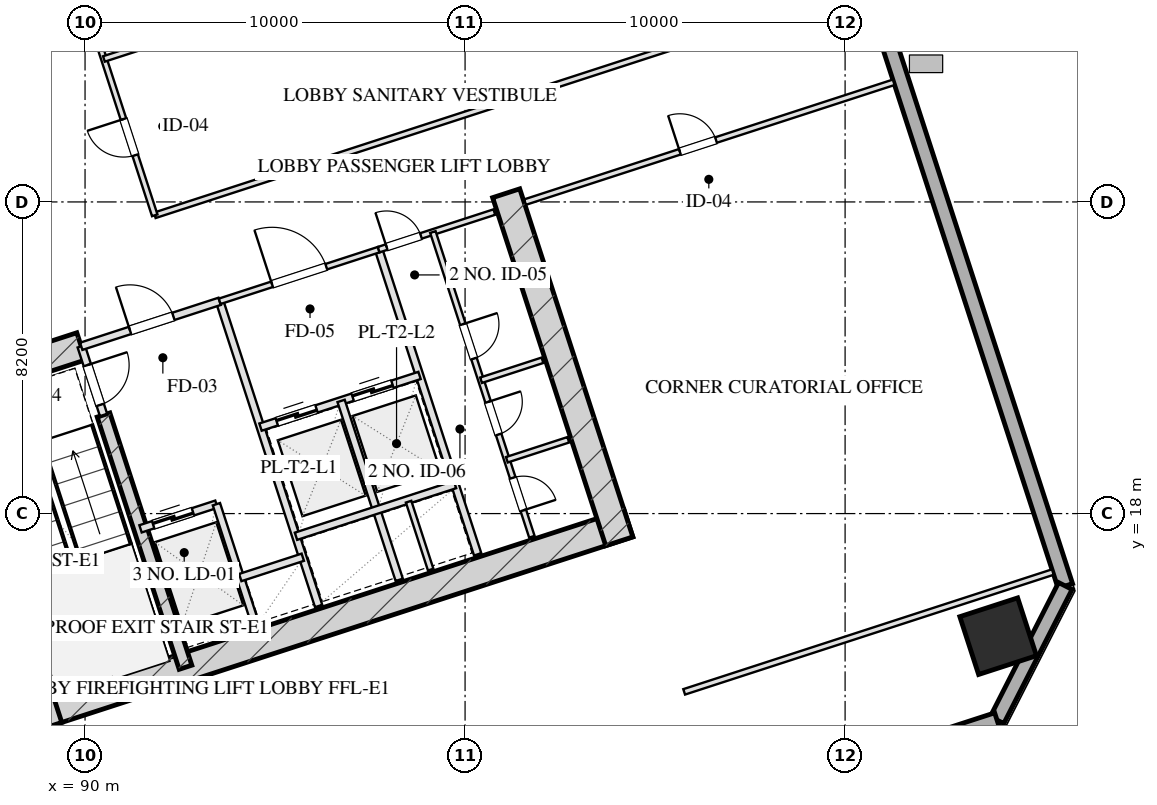
"""IFC4 building model, lengths in metres.
Left out: names, types, materials, properties, quantities, classifications, styles, units other than length and angle.
Written with IfcOpenShell. Run it as: python <this file> out.ifc"""

import sys

from ifc_helpers import new_model, si_unit, direction, frame, frame_2d, origin, origin_2d, place, context, subcontext, project, spatial, rectangle, hollow_rectangle, extrude, element, fill, save


model = new_model("IFC4")
c1 = context("Model", 3, precision=1e-05, world=origin(), true_north=direction((0.0, 1.0)))
c2 = subcontext(c1, "Body", "Model", "MODEL_VIEW")
j1 = project(units=[si_unit("LENGTHUNIT", "METRE"), si_unit("PLANEANGLEUNIT", "RADIAN")], contexts=[c1])
p1 = place(None, origin())
s1 = spatial("IfcSite", under=j1, at=p1, CompositionType="ELEMENT")
p2 = place(p1, origin())
s2 = spatial("IfcBuilding", under=s1, at=p2, CompositionType="ELEMENT")
p3 = place(p2, frame((0.0, 0.0, 34.0)))
s3 = spatial("IfcBuildingStorey", under=s2, at=p3, CompositionType="ELEMENT", Elevation=34.0)
p4 = place(p3, frame((88.559, 12.629, 0.0), z_axis=(0.0, 0.0, 1.0), x_axis=(0.951056072937, 0.309018358888, 0.0)))
e1 = element("IfcWall", 1, at=p4, inside=s3, PredefinedType="SHEAR", context=c2, shape_type="SweptSolid", body=[
    extrude(rectangle(XDim=16.55, YDim=0.75, at=frame_2d((8.275, 0.0))), origin(), (0.0, 0.0, 1.0), 4.0),
])
p5 = place(p3, frame((86.055, 21.546, 0.0), z_axis=(0.0, 0.0, 1.0), x_axis=(0.309023585745, -0.951054374604, 0.0)))
e2 = element("IfcWall", 2, at=p5, inside=s3, PredefinedType="SHEAR", context=c2, shape_type="SweptSolid", body=[
    extrude(rectangle(XDim=9.63, YDim=0.75, at=frame_2d((4.815, 0.0))), origin(), (0.0, 0.0, 1.0), 4.0),
])
p6 = place(p3, frame((101.082, 26.429, 0.0), z_axis=(0.0, 0.0, 1.0), x_axis=(0.309016134813, -0.951056795583, 0.0)))
e3 = element("IfcWall", 3, at=p6, inside=s3, PredefinedType="SHEAR", context=c2, shape_type="SweptSolid", body=[
    extrude(rectangle(XDim=9.63, YDim=0.75, at=frame_2d((4.815, 0.0))), origin(), (0.0, 0.0, 1.0), 4.0),
])
p7 = place(p3, frame((90.486, 20.594, 0.0), z_axis=(0.0, 0.0, 1.0), x_axis=(0.309020428229, -0.951055400562, 0.0)))
e4 = element("IfcWall", 4, at=p7, inside=s3, PredefinedType="SHEAR", context=c2, shape_type="SweptSolid", body=[
    extrude(rectangle(XDim=6.98, YDim=0.35, at=frame_2d((3.49, 0.0))), origin(), (0.0, 0.0, 1.0), 4.0),
])
p8 = place(p3, frame((85.814, 21.074, 0.0), z_axis=(0.0, 0.0, 1.0), x_axis=(0.95106580992, 0.308988390074, 0.0)))
e5 = element("IfcWall", 5, at=p8, inside=s3, PredefinedType="SHEAR", context=c2, shape_type="SweptSolid", body=[
    extrude(rectangle(XDim=4.295, YDim=0.75, at=frame_2d((2.147, 0.0))), origin(), (0.0, 0.0, 1.0), 4.0),
])
p9 = place(p3, frame((114.027, 14.774, 0.0), z_axis=(0.0, 0.0, 1.0), x_axis=(0.951056516295, 0.309016994375, 0.0)))
e6 = element("IfcColumn", 6, at=p9, inside=s3, PredefinedType="COLUMN", context=c2, shape_type="SweptSolid", body=[
    extrude(hollow_rectangle(XDim=1.6, YDim=1.6, WallThickness=0.055, at=origin_2d()), origin(), (0.0, 0.0, 1.0), 4.001),
])
p10 = place(p3, frame((100.345, 63.648, 0.0), z_axis=(0.0, 0.0, 1.0), x_axis=(0.309014526607, -0.951057318118, 0.0)))
e7 = element("IfcWall", 7, at=p10, inside=s3, PredefinedType="SOLIDWALL", context=c2, shape_type="SweptSolid", body=[
    extrude(rectangle(XDim=50.0, YDim=0.4, at=frame_2d((25.0, 0.0))), origin(), (0.0, 0.0, 1.0), 3.16),
])
p11 = place(p10, frame((30.15, 0.0, 0.75)))
e8 = element("IfcOpeningElement", 8, at=p11, cuts=e7, PredefinedType="OPENING", context=c2, shape_type="SweptSolid", body=[
    extrude(rectangle(XDim=2.5, YDim=1.75, at=frame_2d((1.25, 0.875))), frame((0.0, 0.21, 0.0), z_axis=(0.0, -1.0, 0.0), x_axis=(1.0, 0.0, 0.0)), (0.0, 0.0, 1.0), 0.42),
])
p12 = place(p10, frame((21.354, 0.0, 0.0)))
e9 = element("IfcOpeningElement", 9, at=p12, cuts=e7, PredefinedType="OPENING", context=c2, shape_type="SweptSolid", body=[
    extrude(rectangle(XDim=1.1, YDim=2.15, at=frame_2d((0.55, 1.075))), frame((0.0, 0.21, 0.0), z_axis=(0.0, -1.0, 0.0), x_axis=(1.0, 0.0, 0.0)), (0.0, 0.0, 1.0), 0.42),
])
p13 = place(p3, frame((115.795, 16.095, 0.0), z_axis=(0.0, 0.0, 1.0), x_axis=(-0.453958106755, -0.891023028497, 0.0)))
e10 = element("IfcWall", 10, at=p13, inside=s3, PredefinedType="SOLIDWALL", context=c2, shape_type="SweptSolid", body=[
    extrude(rectangle(XDim=3.96, YDim=0.4, at=frame_2d((1.98, 0.0))), origin(), (0.0, 0.0, 1.0), 3.16),
])
p14 = place(p3, frame((113.998, 12.567, 0.0), z_axis=(0.0, 0.0, 1.0), x_axis=(-0.951055939317, -0.309018770125, 0.0)))
e11 = element("IfcWall", 11, at=p14, inside=s3, PredefinedType="SOLIDWALL", context=c2, shape_type="SweptSolid", body=[
    extrude(rectangle(XDim=32.4, YDim=0.4, at=frame_2d((16.2, 0.0))), origin(), (0.0, 0.0, 1.0), 3.16),
])
p15 = place(p3, frame((89.899, 22.401, 0.0), z_axis=(0.0, 0.0, 1.0), x_axis=(0.308932062672, -0.951084108086, 0.0)))
e12 = element("IfcWall", 12, at=p15, inside=s3, PredefinedType="PARTITIONING", context=c2, shape_type="SweptSolid", body=[
    extrude(rectangle(XDim=1.9, YDim=0.2, at=frame_2d((0.95, 0.0))), origin(), (0.0, 0.0, 1.0), 3.725),
])
p16 = place(p15, frame((0.52, 0.0, 0.0)))
e13 = element("IfcOpeningElement", 13, at=p16, cuts=e12, PredefinedType="OPENING", context=c2, shape_type="SweptSolid", body=[
    extrude(rectangle(XDim=1.1, YDim=2.05, at=frame_2d((0.55, 1.025))), frame((0.0, 0.11, 0.0), z_axis=(0.0, -1.0, 0.0), x_axis=(1.0, 0.0, 0.0)), (0.0, 0.0, 1.0), 0.22),
])
p17 = place(p3, frame((93.542, 23.585, 0.0), z_axis=(0.0, 0.0, 1.0), x_axis=(0.309042196757, -0.951048327176, 0.0)))
e14 = element("IfcWall", 14, at=p17, inside=s3, PredefinedType="PARTITIONING", context=c2, shape_type="SweptSolid", body=[
    extrude(rectangle(XDim=8.43, YDim=0.2, at=frame_2d((4.215, 0.0))), origin(), (0.0, 0.0, 1.0), 3.725),
])
p18 = place(p3, frame((89.899, 22.401, 0.0), z_axis=(0.0, 0.0, 1.0), x_axis=(0.951046716504, 0.309047153403, 0.0)))
e15 = element("IfcWall", 15, at=p18, inside=s3, PredefinedType="PARTITIONING", context=c2, shape_type="SweptSolid", body=[
    extrude(rectangle(XDim=3.83, YDim=0.2, at=frame_2d((1.915, 0.0))), origin(), (0.0, 0.0, 1.0), 3.725),
])
p19 = place(p18, frame((1.35, 0.0, 0.0)))
e16 = element("IfcOpeningElement", 16, at=p19, cuts=e15, PredefinedType="OPENING", context=c2, shape_type="SweptSolid", body=[
    extrude(rectangle(XDim=1.2, YDim=2.05, at=frame_2d((0.6, 1.025))), frame((0.0, 0.11, 0.0), z_axis=(0.0, -1.0, 0.0), x_axis=(1.0, 0.0, 0.0)), (0.0, 0.0, 1.0), 0.22),
])
p20 = place(p3, frame((91.46, 17.598, 0.0), z_axis=(0.0, 0.0, 1.0), x_axis=(0.951062257173, 0.308999325213, 0.0)))
e17 = element("IfcWall", 17, at=p20, inside=s3, PredefinedType="PARTITIONING", context=c2, shape_type="SweptSolid", body=[
    extrude(rectangle(XDim=2.1, YDim=0.2, at=frame_2d((1.05, 0.0))), origin(), (0.0, 0.0, 1.0), 3.725),
])
p21 = place(p20, frame((0.35, 0.0, 0.0)))
e18 = element("IfcOpeningElement", 18, at=p21, cuts=e17, PredefinedType="OPENING", context=c2, shape_type="SweptSolid", body=[
    extrude(rectangle(XDim=1.1, YDim=2.05, at=frame_2d((0.55, 1.025))), frame((0.0, 0.11, 0.0), z_axis=(0.0, -1.0, 0.0), x_axis=(1.0, 0.0, 0.0)), (0.0, 0.0, 1.0), 0.22),
])
p22 = place(p3, frame((93.457, 18.247, 0.0), z_axis=(0.0, 0.0, 1.0), x_axis=(0.3089935693, -0.951064127245, 0.0)))
e19 = element("IfcWall", 19, at=p22, inside=s3, PredefinedType="PARTITIONING", context=c2, shape_type="SweptSolid", body=[
    extrude(rectangle(XDim=3.7, YDim=0.2, at=frame_2d((1.85, 0.0))), origin(), (0.0, 0.0, 1.0), 3.725),
])
p23 = place(p3, frame((94.084, 16.317, 0.0), z_axis=(0.0, 0.0, 1.0), x_axis=(0.951041328149, 0.309063734775, 0.0)))
e20 = element("IfcWall", 20, at=p23, inside=s3, PredefinedType="PARTITIONING", context=c2, shape_type="SweptSolid", body=[
    extrude(rectangle(XDim=1.73, YDim=0.2, at=frame_2d((0.865, 0.0))), origin(), (0.0, 0.0, 1.0), 3.725),
])
p24 = place(p3, frame((97.727, 24.944, 0.0), z_axis=(0.0, 0.0, 1.0), x_axis=(0.309016001439, -0.951056838919, 0.0)))
e21 = element("IfcWall", 21, at=p24, inside=s3, PredefinedType="PARTITIONING", context=c2, shape_type="SweptSolid", body=[
    extrude(rectangle(XDim=8.43, YDim=0.2, at=frame_2d((4.215, 0.0))), origin(), (0.0, 0.0, 1.0), 3.725),
])
p25 = place(p3, frame((93.542, 23.585, 0.0), z_axis=(0.0, 0.0, 1.0), x_axis=(0.951063829732, 0.308994485023, 0.0)))
e22 = element("IfcWall", 22, at=p25, inside=s3, PredefinedType="PARTITIONING", context=c2, shape_type="SweptSolid", body=[
    extrude(rectangle(XDim=4.4, YDim=0.15, at=frame_2d((2.2, 0.0))), origin(), (0.0, 0.0, 1.0), 3.725),
])
p26 = place(p25, frame((1.45, 0.0, 0.0)))
e23 = element("IfcOpeningElement", 23, at=p26, cuts=e22, PredefinedType="OPENING", context=c2, shape_type="SweptSolid", body=[
    extrude(rectangle(XDim=1.5, YDim=2.05, at=frame_2d((0.75, 1.025))), frame((0.0, 0.085, 0.0), z_axis=(0.0, -1.0, 0.0), x_axis=(1.0, 0.0, 0.0)), (0.0, 0.0, 1.0), 0.17),
])
p27 = place(p3, frame((94.617, 20.275, 0.0), z_axis=(0.0, 0.0, 1.0), x_axis=(0.951058531764, 0.30901079133, 0.0)))
e24 = element("IfcWall", 24, at=p27, inside=s3, PredefinedType="PARTITIONING", context=c2, shape_type="SweptSolid", body=[
    extrude(rectangle(XDim=4.4, YDim=0.2, at=frame_2d((2.2, 0.0))), origin(), (0.0, 0.0, 1.0), 3.725),
])
p28 = place(p27, frame((0.45, 0.0, 0.0)))
e25 = element("IfcOpeningElement", 25, at=p28, cuts=e24, PredefinedType="OPENING", context=c2, shape_type="SweptSolid", body=[
    extrude(rectangle(XDim=1.1, YDim=2.05, at=frame_2d((0.55, 1.025))), frame((0.0, 0.11, 0.0), z_axis=(0.0, -1.0, 0.0), x_axis=(1.0, 0.0, 0.0)), (0.0, 0.0, 1.0), 0.22),
])
p29 = place(p27, frame((2.55, 0.0, 0.0)))
e26 = element("IfcOpeningElement", 26, at=p29, cuts=e24, PredefinedType="OPENING", context=c2, shape_type="SweptSolid", body=[
    extrude(rectangle(XDim=1.1, YDim=2.05, at=frame_2d((0.55, 1.025))), frame((0.0, 0.11, 0.0), z_axis=(0.0, -1.0, 0.0), x_axis=(1.0, 0.0, 0.0)), (0.0, 0.0, 1.0), 0.22),
])
p30 = place(p3, frame((96.738, 20.964, 0.0), z_axis=(0.0, 0.0, 1.0), x_axis=(0.309042578481, -0.951048203135, 0.0)))
e27 = element("IfcWall", 27, at=p30, inside=s3, PredefinedType="PARTITIONING", context=c2, shape_type="SweptSolid", body=[
    extrude(rectangle(XDim=4.95, YDim=0.2, at=frame_2d((2.475, 0.0))), origin(), (0.0, 0.0, 1.0), 3.725),
])
p31 = place(p3, frame((95.551, 17.403, 0.0), z_axis=(0.0, 0.0, 1.0), x_axis=(0.951058531764, 0.30901079133, 0.0)))
e28 = element("IfcWall", 28, at=p31, inside=s3, PredefinedType="PARTITIONING", context=c2, shape_type="SweptSolid", body=[
    extrude(rectangle(XDim=4.4, YDim=0.2, at=frame_2d((2.2, 0.0))), origin(), (0.0, 0.0, 1.0), 3.725),
])
p32 = place(p3, frame((98.514, 18.313, 0.0), z_axis=(0.0, 0.0, 1.0), x_axis=(0.309089008895, -0.951033114345, 0.0)))
e29 = element("IfcWall", 29, at=p32, inside=s3, PredefinedType="PARTITIONING", context=c2, shape_type="SweptSolid", body=[
    extrude(rectangle(XDim=1.88, YDim=0.15, at=frame_2d((0.94, 0.0))), origin(), (0.0, 0.0, 1.0), 3.725),
])
p33 = place(p3, frame((97.727, 24.944, 0.0), z_axis=(0.0, 0.0, 1.0), x_axis=(0.951036872128, 0.309077446369, 0.0)))
e30 = element("IfcWall", 30, at=p33, inside=s3, PredefinedType="PARTITIONING", context=c2, shape_type="SweptSolid", body=[
    extrude(rectangle(XDim=3.2, YDim=0.15, at=frame_2d((1.6, 0.0))), origin(), (0.0, 0.0, 1.0), 3.725),
])
p34 = place(p33, frame((0.22, 0.0, 0.0)))
e31 = element("IfcOpeningElement", 31, at=p34, cuts=e30, PredefinedType="OPENING", context=c2, shape_type="SweptSolid", body=[
    extrude(rectangle(XDim=0.95, YDim=2.05, at=frame_2d((0.475, 1.025))), frame((0.0, 0.085, 0.0), z_axis=(0.0, -1.0, 0.0), x_axis=(1.0, 0.0, 0.0)), (0.0, 0.0, 1.0), 0.17),
])
p35 = place(p3, frame((99.153, 25.408, 0.0), z_axis=(0.0, 0.0, 1.0), x_axis=(0.309016001439, -0.951056838919, 0.0)))
e32 = element("IfcWall", 32, at=p35, inside=s3, PredefinedType="PARTITIONING", context=c2, shape_type="SweptSolid", body=[
    extrude(rectangle(XDim=8.43, YDim=0.15, at=frame_2d((4.215, 0.0))), origin(), (0.0, 0.0, 1.0), 3.725),
])
p36 = place(p35, frame((2.55, 0.0, 0.0)))
e33 = element("IfcOpeningElement", 33, at=p36, cuts=e32, PredefinedType="OPENING", context=c2, shape_type="SweptSolid", body=[
    extrude(rectangle(XDim=0.95, YDim=2.05, at=frame_2d((0.475, 1.025))), frame((0.0, 0.085, 0.0), z_axis=(0.0, -1.0, 0.0), x_axis=(1.0, 0.0, 0.0)), (0.0, 0.0, 1.0), 0.17),
])
p37 = place(p35, frame((4.7, 0.0, 0.0)))
e34 = element("IfcOpeningElement", 34, at=p37, cuts=e32, PredefinedType="OPENING", context=c2, shape_type="SweptSolid", body=[
    extrude(rectangle(XDim=0.9, YDim=2.05, at=frame_2d((0.45, 1.025))), frame((0.0, 0.085, 0.0), z_axis=(0.0, -1.0, 0.0), x_axis=(1.0, 0.0, 0.0)), (0.0, 0.0, 1.0), 0.17),
])
p38 = place(p35, frame((6.8, 0.0, 0.0)))
e35 = element("IfcOpeningElement", 35, at=p38, cuts=e32, PredefinedType="OPENING", context=c2, shape_type="SweptSolid", body=[
    extrude(rectangle(XDim=0.9, YDim=2.05, at=frame_2d((0.45, 1.025))), frame((0.0, 0.085, 0.0), z_axis=(0.0, -1.0, 0.0), x_axis=(1.0, 0.0, 0.0)), (0.0, 0.0, 1.0), 0.17),
])
p39 = place(p3, frame((100.42, 21.509, 0.0), z_axis=(0.0, 0.0, 1.0), x_axis=(0.951040401051, 0.309066587596, 0.0)))
e36 = element("IfcWall", 36, at=p39, inside=s3, PredefinedType="PARTITIONING", context=c2, shape_type="SweptSolid", body=[
    extrude(rectangle(XDim=1.7, YDim=0.15, at=frame_2d((0.85, 0.0))), origin(), (0.0, 0.0, 1.0), 3.725),
])
p40 = place(p3, frame((101.1, 19.416, 0.0), z_axis=(0.0, 0.0, 1.0), x_axis=(0.951054116971, 0.309024378638, 0.0)))
e37 = element("IfcWall", 37, at=p40, inside=s3, PredefinedType="PARTITIONING", context=c2, shape_type="SweptSolid", body=[
    extrude(rectangle(XDim=1.7, YDim=0.15, at=frame_2d((0.85, 0.0))), origin(), (0.0, 0.0, 1.0), 3.725),
])
p41 = place(p3, frame((105.765, 13.309, 0.0), z_axis=(0.0, 0.0, 1.0), x_axis=(0.951054294345, 0.309023832749, 0.0)))
e38 = element("IfcWall", 38, at=p41, inside=s3, PredefinedType="PARTITIONING", context=c2, shape_type="SweptSolid", body=[
    extrude(rectangle(XDim=10.2, YDim=0.15, at=frame_2d((5.1, 0.0))), origin(), (0.0, 0.0, 1.0), 3.725),
])
p42 = place(p3, frame((101.578, 26.196, 0.0), z_axis=(0.0, 0.0, 1.0), x_axis=(0.951059043131, 0.309009217467, 0.0)))
e39 = element("IfcWall", 39, at=p42, inside=s3, PredefinedType="PARTITIONING", context=c2, shape_type="SweptSolid", body=[
    extrude(rectangle(XDim=10.2, YDim=0.15, at=frame_2d((5.1, 0.0))), origin(), (0.0, 0.0, 1.0), 3.725),
])
p43 = place(p42, frame((4.284, 0.0, 0.0)))
e40 = element("IfcOpeningElement", 40, at=p43, cuts=e39, PredefinedType="OPENING", context=c2, shape_type="SweptSolid", body=[
    extrude(rectangle(XDim=1.0, YDim=2.05, at=frame_2d((0.5, 1.025))), frame((0.0, 0.085, 0.0), z_axis=(0.0, -1.0, 0.0), x_axis=(1.0, 0.0, 0.0)), (0.0, 0.0, 1.0), 0.17),
])
p44 = place(p3, frame((91.834, 25.848, 0.0), z_axis=(0.0, 0.0, 1.0), x_axis=(0.951055605195, 0.309019798438, 0.0)))
e41 = element("IfcWall", 41, at=p44, inside=s3, PredefinedType="PARTITIONING", context=c2, shape_type="SweptSolid", body=[
    extrude(rectangle(XDim=19.575, YDim=0.15, at=frame_2d((9.788, 0.0))), origin(), (0.0, 0.0, 1.0), 3.725),
])
p45 = place(p3, frame((91.834, 25.848, 0.0), z_axis=(0.0, 0.0, 1.0), x_axis=(-0.30901773025, 0.951056277195, 0.0)))
e42 = element("IfcWall", 42, at=p45, inside=s3, PredefinedType="PARTITIONING", context=c2, shape_type="SweptSolid", body=[
    extrude(rectangle(XDim=16.64, YDim=0.15, at=frame_2d((8.32, 0.0))), origin(), (0.0, 0.0, 1.0), 3.725),
])
p46 = place(p45, frame((1.663, 0.0, 0.0)))
e43 = element("IfcOpeningElement", 43, at=p46, cuts=e42, PredefinedType="OPENING", context=c2, shape_type="SweptSolid", body=[
    extrude(rectangle(XDim=1.0, YDim=2.05, at=frame_2d((0.5, 1.025))), frame((0.0, 0.085, 0.0), z_axis=(0.0, -1.0, 0.0), x_axis=(1.0, 0.0, 0.0)), (0.0, 0.0, 1.0), 0.17),
])
p47 = place(p45, frame((6.156, 0.0, 0.0)))
e44 = element("IfcOpeningElement", 44, at=p47, cuts=e42, PredefinedType="OPENING", context=c2, shape_type="SweptSolid", body=[
    extrude(rectangle(XDim=1.0, YDim=2.05, at=frame_2d((0.5, 1.025))), frame((0.0, 0.085, 0.0), z_axis=(0.0, -1.0, 0.0), x_axis=(1.0, 0.0, 0.0)), (0.0, 0.0, 1.0), 0.17),
])
p48 = place(p45, frame((10.649, 0.0, 0.0)))
e45 = element("IfcOpeningElement", 45, at=p48, cuts=e42, PredefinedType="OPENING", context=c2, shape_type="SweptSolid", body=[
    extrude(rectangle(XDim=0.85, YDim=2.05, at=frame_2d((0.425, 1.025))), frame((0.0, 0.085, 0.0), z_axis=(0.0, -1.0, 0.0), x_axis=(1.0, 0.0, 0.0)), (0.0, 0.0, 1.0), 0.17),
])
p49 = place(p45, frame((14.476, 0.0, 0.0)))
e46 = element("IfcOpeningElement", 46, at=p49, cuts=e42, PredefinedType="OPENING", context=c2, shape_type="SweptSolid", body=[
    extrude(rectangle(XDim=1.0, YDim=2.05, at=frame_2d((0.5, 1.025))), frame((0.0, 0.085, 0.0), z_axis=(0.0, -1.0, 0.0), x_axis=(1.0, 0.0, 0.0)), (0.0, 0.0, 1.0), 0.17),
])
p50 = place(p3, frame((90.497, 29.962, 0.0), z_axis=(0.0, 0.0, 1.0), x_axis=(0.951055605195, 0.309019798438, 0.0)))
e47 = element("IfcWall", 47, at=p50, inside=s3, PredefinedType="PARTITIONING", context=c2, shape_type="SweptSolid", body=[
    extrude(rectangle(XDim=19.575, YDim=0.15, at=frame_2d((9.788, 0.0))), origin(), (0.0, 0.0, 1.0), 3.725),
])
p51 = place(p16, origin())
e48 = element("IfcDoor", 48, at=p51, inside=s3, OperationType="SINGLE_SWING_LEFT", PredefinedType="DOOR", context=c2, shape_type="SweptSolid", body=[
    extrude(rectangle(XDim=1.1, YDim=2.05, at=frame_2d((0.55, 1.025))), frame((0.0, 0.025, 0.0), z_axis=(0.0, -1.0, 0.0), x_axis=(1.0, 0.0, 0.0)), (0.0, 0.0, 1.0), 0.05),
])
fill(e13, e48)
p52 = place(p19, origin())
e49 = element("IfcDoor", 49, at=p52, inside=s3, OperationType="SINGLE_SWING_LEFT", PredefinedType="DOOR", context=c2, shape_type="SweptSolid", body=[
    extrude(rectangle(XDim=1.2, YDim=2.05, at=frame_2d((0.6, 1.025))), frame((0.0, 0.025, 0.0), z_axis=(0.0, -1.0, 0.0), x_axis=(1.0, 0.0, 0.0)), (0.0, 0.0, 1.0), 0.05),
])
fill(e16, e49)
p53 = place(p21, origin())
e50 = element("IfcDoor", 50, at=p53, inside=s3, OperationType="DOUBLE_DOOR_SLIDING", PredefinedType="DOOR", context=c2, shape_type="SweptSolid", body=[
    extrude(rectangle(XDim=1.1, YDim=2.05, at=frame_2d((0.55, 1.025))), frame((0.0, 0.025, 0.0), z_axis=(0.0, -1.0, 0.0), x_axis=(1.0, 0.0, 0.0)), (0.0, 0.0, 1.0), 0.05),
])
fill(e18, e50)
p54 = place(p26, origin())
e51 = element("IfcDoor", 51, at=p54, inside=s3, OperationType="SINGLE_SWING_LEFT", PredefinedType="DOOR", context=c2, shape_type="SweptSolid", body=[
    extrude(rectangle(XDim=1.5, YDim=2.05, at=frame_2d((0.75, 1.025))), frame((0.0, 0.025, 0.0), z_axis=(0.0, -1.0, 0.0), x_axis=(1.0, 0.0, 0.0)), (0.0, 0.0, 1.0), 0.05),
])
fill(e23, e51)
p55 = place(p28, origin())
e52 = element("IfcDoor", 52, at=p55, inside=s3, OperationType="DOUBLE_DOOR_SLIDING", PredefinedType="DOOR", context=c2, shape_type="SweptSolid", body=[
    extrude(rectangle(XDim=1.1, YDim=2.05, at=frame_2d((0.55, 1.025))), frame((0.0, 0.025, 0.0), z_axis=(0.0, -1.0, 0.0), x_axis=(1.0, 0.0, 0.0)), (0.0, 0.0, 1.0), 0.05),
])
fill(e25, e52)
p56 = place(p29, origin())
e53 = element("IfcDoor", 53, at=p56, inside=s3, OperationType="DOUBLE_DOOR_SLIDING", PredefinedType="DOOR", context=c2, shape_type="SweptSolid", body=[
    extrude(rectangle(XDim=1.1, YDim=2.05, at=frame_2d((0.55, 1.025))), frame((0.0, 0.025, 0.0), z_axis=(0.0, -1.0, 0.0), x_axis=(1.0, 0.0, 0.0)), (0.0, 0.0, 1.0), 0.05),
])
fill(e26, e53)
p57 = place(p34, origin())
e54 = element("IfcDoor", 54, at=p57, inside=s3, OperationType="SINGLE_SWING_LEFT", PredefinedType="DOOR", context=c2, shape_type="SweptSolid", body=[
    extrude(rectangle(XDim=0.95, YDim=2.05, at=frame_2d((0.475, 1.025))), frame((0.0, 0.025, 0.0), z_axis=(0.0, -1.0, 0.0), x_axis=(1.0, 0.0, 0.0)), (0.0, 0.0, 1.0), 0.05),
])
fill(e31, e54)
p58 = place(p36, origin())
e55 = element("IfcDoor", 55, at=p58, inside=s3, OperationType="SINGLE_SWING_LEFT", PredefinedType="DOOR", context=c2, shape_type="SweptSolid", body=[
    extrude(rectangle(XDim=0.95, YDim=2.05, at=frame_2d((0.475, 1.025))), frame((0.0, 0.025, 0.0), z_axis=(0.0, -1.0, 0.0), x_axis=(1.0, 0.0, 0.0)), (0.0, 0.0, 1.0), 0.05),
])
fill(e33, e55)
p59 = place(p37, origin())
e56 = element("IfcDoor", 56, at=p59, inside=s3, OperationType="SINGLE_SWING_LEFT", PredefinedType="DOOR", context=c2, shape_type="SweptSolid", body=[
    extrude(rectangle(XDim=0.9, YDim=2.05, at=frame_2d((0.45, 1.025))), frame((0.0, 0.025, 0.0), z_axis=(0.0, -1.0, 0.0), x_axis=(1.0, 0.0, 0.0)), (0.0, 0.0, 1.0), 0.05),
])
fill(e34, e56)
p60 = place(p38, origin())
e57 = element("IfcDoor", 57, at=p60, inside=s3, OperationType="SINGLE_SWING_RIGHT", PredefinedType="DOOR", context=c2, shape_type="SweptSolid", body=[
    extrude(rectangle(XDim=0.9, YDim=2.05, at=frame_2d((0.45, 1.025))), frame((0.0, 0.025, 0.0), z_axis=(0.0, -1.0, 0.0), x_axis=(1.0, 0.0, 0.0)), (0.0, 0.0, 1.0), 0.05),
])
fill(e35, e57)
p61 = place(p43, origin())
e58 = element("IfcDoor", 58, at=p61, inside=s3, OperationType="SINGLE_SWING_LEFT", PredefinedType="DOOR", context=c2, shape_type="SweptSolid", body=[
    extrude(rectangle(XDim=1.0, YDim=2.05, at=frame_2d((0.5, 1.025))), frame((0.0, 0.025, 0.0), z_axis=(0.0, -1.0, 0.0), x_axis=(1.0, 0.0, 0.0)), (0.0, 0.0, 1.0), 0.05),
])
fill(e40, e58)
p62 = place(p46, origin())
e59 = element("IfcDoor", 59, at=p62, inside=s3, OperationType="SINGLE_SWING_RIGHT", PredefinedType="DOOR", context=c2, shape_type="SweptSolid", body=[
    extrude(rectangle(XDim=1.0, YDim=2.05, at=frame_2d((0.5, 1.025))), frame((0.0, 0.025, 0.0), z_axis=(0.0, -1.0, 0.0), x_axis=(1.0, 0.0, 0.0)), (0.0, 0.0, 1.0), 0.05),
])
fill(e43, e59)
save(model, sys.argv[1])
